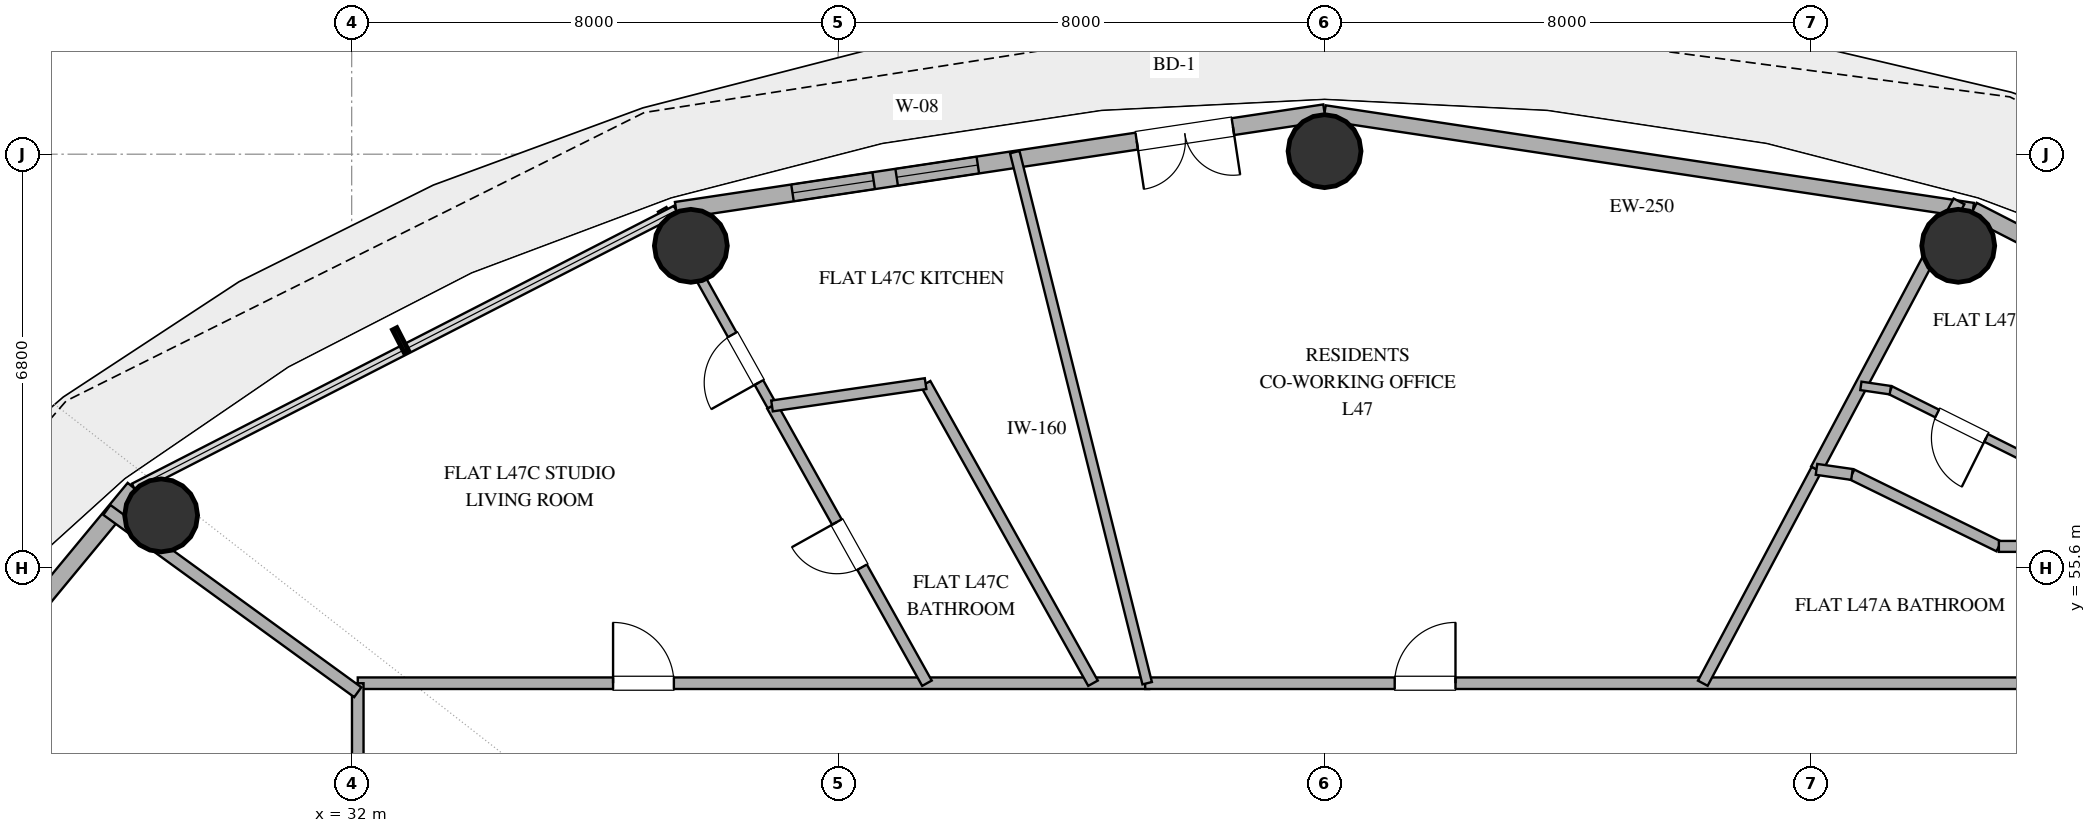
"""IFC4 building model, lengths in metres.
Left out: names, types, materials, properties, quantities, classifications, styles, units other than length and angle.
Written with IfcOpenShell. Run it as: python <this file> out.ifc"""

import sys

from ifc_helpers import new_model, si_unit, direction, frame, frame_2d, origin, origin_2d, place, context, subcontext, project, spatial, rectangle, hollow_circle, extrude, element, fill, save


model = new_model("IFC4")
c1 = context("Model", 3, precision=1e-05, world=origin(), true_north=direction((0.0, 1.0)))
c2 = subcontext(c1, "Body", "Model", "MODEL_VIEW")
j1 = project(units=[si_unit("LENGTHUNIT", "METRE"), si_unit("PLANEANGLEUNIT", "RADIAN")], contexts=[c1])
p1 = place(None, origin())
s1 = spatial("IfcSite", under=j1, at=p1, CompositionType="ELEMENT")
p2 = place(p1, origin())
s2 = spatial("IfcBuilding", under=s1, at=p2, CompositionType="ELEMENT")
p3 = place(p2, frame((0.0, 0.0, 186.6)))
s3 = spatial("IfcBuildingStorey", under=s2, at=p3, CompositionType="ELEMENT", Elevation=186.6)
for number, where, z_axis, x_axis in (
    (1, (58.422, 60.893, 0.0), (0.0, 0.0, 1.0), (1.0, 0.0, 0.0)),
    (2, (48.0, 62.45, 0.0), (0.0, 0.0, 1.0), (1.0, 0.0, 0.0)),
    (3, (37.578, 60.893, 0.0), (0.0, 0.0, 1.0), (1.0, 0.0, 0.0)),
    (4, (28.866, 56.46, 0.0), (0.0, 0.0, 1.0), (1.0, 0.0, 0.0)),
):
    element("IfcColumn", number, at=place(p3, frame(where, z_axis=z_axis, x_axis=x_axis)), inside=s3, PredefinedType="COLUMN", context=c2, shape_type="SweptSolid", body=[
        extrude(hollow_circle(Radius=0.6, WallThickness=0.032, at=origin_2d()), origin(), (0.0, 0.0, 1.0), 3.38),
    ])
p4 = place(p3, frame((67.576, 56.906, 0.0), z_axis=(0.0, 0.0, 1.0), x_axis=(-0.889872523182, 0.456209263919, 0.0)))
e5 = element("IfcWall", 5, at=p4, inside=s3, PredefinedType="SOLIDWALL", context=c2, shape_type="SweptSolid", body=[
    extrude(rectangle(XDim=10.016, YDim=0.28, at=frame_2d((5.008, 0.0))), origin(), (0.0, 0.0, 1.0), 3.38),
])
p5 = place(p4, frame((3.196, 0.0, 0.85)))
e6 = element("IfcOpeningElement", 6, at=p5, cuts=e5, PredefinedType="OPENING", context=c2, shape_type="SweptSolid", body=[
    extrude(rectangle(XDim=1.65, YDim=2.0, at=frame_2d((0.825, 1.0))), frame((0.0, 0.15, 0.0), z_axis=(0.0, -1.0, 0.0), x_axis=(1.0, 0.0, 0.0)), (0.0, 0.0, 1.0), 0.3),
])
p6 = place(p4, frame((6.524, 0.0, 0.85)))
e7 = element("IfcOpeningElement", 7, at=p6, cuts=e5, PredefinedType="OPENING", context=c2, shape_type="SweptSolid", body=[
    extrude(rectangle(XDim=1.5, YDim=2.0, at=frame_2d((0.75, 1.0))), frame((0.0, 0.15, 0.0), z_axis=(0.0, -1.0, 0.0), x_axis=(1.0, 0.0, 0.0)), (0.0, 0.0, 1.0), 0.3),
])
p7 = place(p3, frame((58.663, 61.475, 0.0), z_axis=(0.0, 0.0, 1.0), x_axis=(-0.988863993413, 0.148822049884, 0.0)))
e8 = element("IfcWall", 8, at=p7, inside=s3, PredefinedType="SOLIDWALL", context=c2, shape_type="SweptSolid", body=[
    extrude(rectangle(XDim=10.783, YDim=0.25, at=frame_2d((5.392, 0.0))), origin(), (0.0, 0.0, 1.0), 3.38),
])
p8 = place(p3, frame((48.0, 63.08, 0.0), z_axis=(0.0, 0.0, 1.0), x_axis=(-0.988863993413, -0.148822049884, 0.0)))
e9 = element("IfcWall", 9, at=p8, inside=s3, PredefinedType="SOLIDWALL", context=c2, shape_type="SweptSolid", body=[
    extrude(rectangle(XDim=10.783, YDim=0.28, at=frame_2d((5.392, 0.0))), origin(), (0.0, 0.0, 1.0), 3.38),
])
p9 = place(p8, frame((1.524, 0.0, 0.0)))
e10 = element("IfcOpeningElement", 10, at=p9, cuts=e9, PredefinedType="OPENING", context=c2, shape_type="SweptSolid", body=[
    extrude(rectangle(XDim=1.6, YDim=2.25, at=frame_2d((0.8, 1.125))), frame((0.0, 0.15, 0.0), z_axis=(0.0, -1.0, 0.0), x_axis=(1.0, 0.0, 0.0)), (0.0, 0.0, 1.0), 0.3),
])
p10 = place(p8, frame((5.767, 0.0, 0.85)))
e11 = element("IfcOpeningElement", 11, at=p10, cuts=e9, PredefinedType="OPENING", context=c2, shape_type="SweptSolid", body=[
    extrude(rectangle(XDim=1.35, YDim=1.8, at=frame_2d((0.675, 0.9))), frame((0.0, 0.15, 0.0), z_axis=(0.0, -1.0, 0.0), x_axis=(1.0, 0.0, 0.0)), (0.0, 0.0, 1.0), 0.3),
])
p11 = place(p8, frame((7.499, 0.0, 0.85)))
e12 = element("IfcOpeningElement", 12, at=p11, cuts=e9, PredefinedType="OPENING", context=c2, shape_type="SweptSolid", body=[
    extrude(rectangle(XDim=1.35, YDim=1.8, at=frame_2d((0.675, 0.9))), frame((0.0, 0.15, 0.0), z_axis=(0.0, -1.0, 0.0), x_axis=(1.0, 0.0, 0.0)), (0.0, 0.0, 1.0), 0.3),
])
p12 = place(p3, frame((28.424, 56.906, 0.0), z_axis=(0.0, 0.0, 1.0), x_axis=(-0.637333477683, -0.770588111915, 0.0)))
e13 = element("IfcWall", 13, at=p12, inside=s3, PredefinedType="SOLIDWALL", context=c2, shape_type="SweptSolid", body=[
    extrude(rectangle(XDim=8.875, YDim=0.28, at=frame_2d((4.438, 0.0))), origin(), (0.0, 0.0, 1.0), 3.38),
])
p13 = place(p12, frame((2.302, 0.0, 0.85)))
e14 = element("IfcOpeningElement", 14, at=p13, cuts=e13, PredefinedType="OPENING", context=c2, shape_type="SweptSolid", body=[
    extrude(rectangle(XDim=1.2, YDim=1.8, at=frame_2d((0.6, 0.9))), frame((0.0, 0.15, 0.0), z_axis=(0.0, -1.0, 0.0), x_axis=(1.0, 0.0, 0.0)), (0.0, 0.0, 1.0), 0.3),
])
p14 = place(p12, frame((4.344, 0.0, 0.85)))
e15 = element("IfcOpeningElement", 15, at=p14, cuts=e13, PredefinedType="OPENING", context=c2, shape_type="SweptSolid", body=[
    extrude(rectangle(XDim=1.2, YDim=1.8, at=frame_2d((0.6, 0.9))), frame((0.0, 0.15, 0.0), z_axis=(0.0, -1.0, 0.0), x_axis=(1.0, 0.0, 0.0)), (0.0, 0.0, 1.0), 0.3),
])
p15 = place(p3, frame((32.1, 53.7, 0.0), z_axis=(0.0, 0.0, 1.0), x_axis=(1.0, 0.0, 0.0)))
e16 = element("IfcWall", 16, at=p15, inside=s3, PredefinedType="PARTITIONING", context=c2, shape_type="SweptSolid", body=[
    extrude(rectangle(XDim=13.016, YDim=0.19, at=frame_2d((6.508, 0.0))), origin(), (0.0, 0.0, 1.0), 2.74),
])
p16 = place(p15, frame((4.199, 0.0, 0.0)))
e17 = element("IfcOpeningElement", 17, at=p16, cuts=e16, PredefinedType="OPENING", context=c2, shape_type="SweptSolid", body=[
    extrude(rectangle(XDim=1.0, YDim=2.2, at=frame_2d((0.5, 1.1))), frame((0.0, 0.105, 0.0), z_axis=(0.0, -1.0, 0.0), x_axis=(1.0, 0.0, 0.0)), (0.0, 0.0, 1.0), 0.21),
])
p17 = place(p3, frame((45.05, 53.7, 0.0), z_axis=(0.0, 0.0, 1.0), x_axis=(1.0, 0.0, 0.0)))
e18 = element("IfcWall", 18, at=p17, inside=s3, PredefinedType="PARTITIONING", context=c2, shape_type="SweptSolid", body=[
    extrude(rectangle(XDim=18.85, YDim=0.19, at=frame_2d((9.425, 0.0))), origin(), (0.0, 0.0, 1.0), 2.74),
])
p18 = place(p17, frame((4.104, 0.0, 0.0)))
e19 = element("IfcOpeningElement", 19, at=p18, cuts=e18, PredefinedType="OPENING", context=c2, shape_type="SweptSolid", body=[
    extrude(rectangle(XDim=1.0, YDim=2.2, at=frame_2d((0.5, 1.1))), frame((0.0, 0.105, 0.0), z_axis=(0.0, -1.0, 0.0), x_axis=(1.0, 0.0, 0.0)), (0.0, 0.0, 1.0), 0.21),
])
p19 = place(p3, frame((45.083, 53.7, 0.0), z_axis=(0.0, 0.0, 1.0), x_axis=(-0.241929318505, 0.970293875508, 0.0)))
e20 = element("IfcWall", 20, at=p19, inside=s3, PredefinedType="PLUMBINGWALL", context=c2, shape_type="SweptSolid", body=[
    extrude(rectangle(XDim=9.001, YDim=0.16, at=frame_2d((4.501, 0.0))), origin(), (0.0, 0.0, 1.0), 2.74),
])
p20 = place(p3, frame((32.1, 42.765, 0.0), z_axis=(0.0, 0.0, 1.0), x_axis=(0.0, 1.0, 0.0)))
e21 = element("IfcWall", 21, at=p20, inside=s3, PredefinedType="PARTITIONING", context=c2, shape_type="SweptSolid", body=[
    extrude(rectangle(XDim=10.935, YDim=0.19, at=frame_2d((5.467, 0.0))), origin(), (0.0, 0.0, 1.0), 2.74),
])
p21 = place(p20, frame((6.06, 0.0, 0.0)))
e22 = element("IfcOpeningElement", 22, at=p21, cuts=e21, PredefinedType="OPENING", context=c2, shape_type="SweptSolid", body=[
    extrude(rectangle(XDim=1.0, YDim=2.2, at=frame_2d((0.5, 1.1))), frame((0.0, 0.105, 0.0), z_axis=(0.0, -1.0, 0.0), x_axis=(1.0, 0.0, 0.0)), (0.0, 0.0, 1.0), 0.21),
])
p22 = place(p3, frame((41.439, 58.627, 0.0), z_axis=(0.0, 0.0, 1.0), x_axis=(0.487819418615, -0.872944565721, 0.0)))
e23 = element("IfcWall", 23, at=p22, inside=s3, PredefinedType="PLUMBINGWALL", context=c2, shape_type="SweptSolid", body=[
    extrude(rectangle(XDim=5.644, YDim=0.18, at=frame_2d((2.822, 0.0))), origin(), (0.0, 0.0, 1.0), 2.74),
])
p23 = place(p3, frame((41.461, 53.7, 0.0), z_axis=(0.0, 0.0, 1.0), x_axis=(-0.487871640049, 0.872915381257, 0.0)))
e24 = element("IfcWall", 24, at=p23, inside=s3, PredefinedType="PLUMBINGWALL", context=c2, shape_type="SweptSolid", body=[
    extrude(rectangle(XDim=5.223, YDim=0.18, at=frame_2d((2.612, 0.0))), origin(), (0.0, 0.0, 1.0), 2.74),
])
p24 = place(p23, frame((2.187, 0.0, 0.0)))
e25 = element("IfcOpeningElement", 25, at=p24, cuts=e24, PredefinedType="OPENING", context=c2, shape_type="SweptSolid", body=[
    extrude(rectangle(XDim=0.85, YDim=2.1, at=frame_2d((0.425, 1.05))), frame((0.0, 0.1, 0.0), z_axis=(0.0, -1.0, 0.0), x_axis=(1.0, 0.0, 0.0)), (0.0, 0.0, 1.0), 0.2),
])
p25 = place(p3, frame((32.1, 53.552, 0.0), z_axis=(0.0, 0.0, 1.0), x_axis=(-0.809023715391, 0.587776001496, 0.0)))
e26 = element("IfcWall", 26, at=p25, inside=s3, PredefinedType="PARTITIONING", context=c2, shape_type="SweptSolid", body=[
    extrude(rectangle(XDim=5.1, YDim=0.2, at=frame_2d((2.55, 0.0))), origin(), (0.0, 0.0, 1.0), 2.74),
])
p26 = place(p3, frame((54.221, 53.7, 0.0), z_axis=(0.0, 0.0, 1.0), x_axis=(0.469480828888, 0.882942665922, 0.0)))
e27 = element("IfcWall", 27, at=p26, inside=s3, PredefinedType="PLUMBINGWALL", context=c2, shape_type="SweptSolid", body=[
    extrude(rectangle(XDim=3.983, YDim=0.18, at=frame_2d((1.992, 0.0))), origin(), (0.0, 0.0, 1.0), 2.74),
])
p27 = place(p3, frame((38.913, 58.26, 0.0), z_axis=(0.0, 0.0, 1.0), x_axis=(-0.487830223896, 0.87293852742, 0.0)))
e28 = element("IfcWall", 28, at=p27, inside=s3, PredefinedType="PLUMBINGWALL", context=c2, shape_type="SweptSolid", body=[
    extrude(rectangle(XDim=3.703, YDim=0.16, at=frame_2d((1.852, 0.0))), origin(), (0.0, 0.0, 1.0), 2.74),
])
p28 = place(p27, frame((0.441, 0.0, 0.0)))
e29 = element("IfcOpeningElement", 29, at=p28, cuts=e28, PredefinedType="OPENING", context=c2, shape_type="SweptSolid", body=[
    extrude(rectangle(XDim=0.9, YDim=2.1, at=frame_2d((0.45, 1.05))), frame((0.0, 0.09, 0.0), z_axis=(0.0, -1.0, 0.0), x_axis=(1.0, 0.0, 0.0)), (0.0, 0.0, 1.0), 0.18),
])
p29 = place(p3, frame((56.091, 57.217, 0.0), z_axis=(0.0, 0.0, 1.0), x_axis=(0.469455598571, 0.882956080997, 0.0)))
e30 = element("IfcWall", 30, at=p29, inside=s3, PredefinedType="PARTITIONING", context=c2, shape_type="SweptSolid", body=[
    extrude(rectangle(XDim=4.991, YDim=0.2, at=frame_2d((2.496, 0.0))), origin(), (0.0, 0.0, 1.0), 2.74),
])
p30 = place(p3, frame((56.674, 57.133, 0.0), z_axis=(0.0, 0.0, 1.0), x_axis=(0.898063439596, -0.439865955105, 0.0)))
e31 = element("IfcWall", 31, at=p30, inside=s3, PredefinedType="PLUMBINGWALL", context=c2, shape_type="SweptSolid", body=[
    extrude(rectangle(XDim=2.69, YDim=0.18, at=frame_2d((1.345, 0.0))), origin(), (0.0, 0.0, 1.0), 2.74),
])
p31 = place(p3, frame((59.651, 57.35, 0.0), z_axis=(0.0, 0.0, 1.0), x_axis=(-0.895041110332, 0.445983644112, 0.0)))
e32 = element("IfcWall", 32, at=p31, inside=s3, PredefinedType="PARTITIONING", context=c2, shape_type="SweptSolid", body=[
    extrude(rectangle(XDim=2.621, YDim=0.14, at=frame_2d((1.311, 0.0))), origin(), (0.0, 0.0, 1.0), 2.74),
])
p32 = place(p31, frame((0.861, 0.0, 0.0)))
e33 = element("IfcOpeningElement", 33, at=p32, cuts=e32, PredefinedType="OPENING", context=c2, shape_type="SweptSolid", body=[
    extrude(rectangle(XDim=0.9, YDim=2.1, at=frame_2d((0.45, 1.05))), frame((0.0, 0.08, 0.0), z_axis=(0.0, -1.0, 0.0), x_axis=(1.0, 0.0, 0.0)), (0.0, 0.0, 1.0), 0.16),
])
p33 = place(p3, frame((38.913, 58.26, 0.0), z_axis=(0.0, 0.0, 1.0), x_axis=(0.989598326399, 0.143858098096, 0.0)))
e34 = element("IfcWall", 34, at=p33, inside=s3, PredefinedType="PLUMBINGWALL", context=c2, shape_type="SweptSolid", body=[
    extrude(rectangle(XDim=2.552, YDim=0.18, at=frame_2d((1.276, 0.0))), origin(), (0.0, 0.0, 1.0), 2.74),
])
p34 = place(p3, frame((59.09, 55.95, 0.0), z_axis=(0.0, 0.0, 1.0), x_axis=(1.0, 0.0, 0.0)))
e35 = element("IfcWall", 35, at=p34, inside=s3, PredefinedType="PLUMBINGWALL", context=c2, shape_type="SweptSolid", body=[
    extrude(rectangle(XDim=1.737, YDim=0.18, at=frame_2d((0.868, 0.0))), origin(), (0.0, 0.0, 1.0), 2.74),
])
p35 = place(p3, frame((56.091, 57.217, 0.0), z_axis=(0.0, 0.0, 1.0), x_axis=(0.989841434531, -0.142175716936, 0.0)))
e36 = element("IfcWall", 36, at=p35, inside=s3, PredefinedType="PLUMBINGWALL", context=c2, shape_type="SweptSolid", body=[
    extrude(rectangle(XDim=0.589, YDim=0.18, at=frame_2d((0.294, 0.0))), origin(), (0.0, 0.0, 1.0), 2.74),
])
p36 = place(p3, frame((57.305, 58.519, 0.0), z_axis=(0.0, 0.0, 1.0), x_axis=(-0.989485449351, 0.144632449754, 0.0)))
e37 = element("IfcWall", 37, at=p36, inside=s3, PredefinedType="PARTITIONING", context=c2, shape_type="SweptSolid", body=[
    extrude(rectangle(XDim=0.49, YDim=0.14, at=frame_2d((0.245, 0.0))), origin(), (0.0, 0.0, 1.0), 2.74),
])
p37 = place(p9, origin())
e38 = element("IfcDoor", 38, at=p37, inside=s3, OperationType="DOUBLE_DOOR_SINGLE_SWING", PredefinedType="DOOR", context=c2, shape_type="SweptSolid", body=[
    extrude(rectangle(XDim=1.6, YDim=2.25, at=frame_2d((0.8, 1.125))), frame((0.0, 0.025, 0.0), z_axis=(0.0, -1.0, 0.0), x_axis=(1.0, 0.0, 0.0)), (0.0, 0.0, 1.0), 0.05),
])
fill(e10, e38)
p38 = place(p10, origin())
e39 = element("IfcWindow", 39, at=p38, inside=s3, PartitioningType="SINGLE_PANEL", PredefinedType="WINDOW", context=c2, shape_type="SweptSolid", body=[
    extrude(rectangle(XDim=1.35, YDim=1.8, at=frame_2d((0.675, 0.9))), frame((0.0, 0.03, 0.0), z_axis=(0.0, -1.0, 0.0), x_axis=(1.0, 0.0, 0.0)), (0.0, 0.0, 1.0), 0.06),
])
fill(e11, e39)
p39 = place(p11, origin())
e40 = element("IfcWindow", 40, at=p39, inside=s3, PartitioningType="SINGLE_PANEL", PredefinedType="WINDOW", context=c2, shape_type="SweptSolid", body=[
    extrude(rectangle(XDim=1.35, YDim=1.8, at=frame_2d((0.675, 0.9))), frame((0.0, 0.03, 0.0), z_axis=(0.0, -1.0, 0.0), x_axis=(1.0, 0.0, 0.0)), (0.0, 0.0, 1.0), 0.06),
])
fill(e12, e40)
p40 = place(p16, origin())
e41 = element("IfcDoor", 41, at=p40, inside=s3, OperationType="SINGLE_SWING_LEFT", PredefinedType="DOOR", context=c2, shape_type="SweptSolid", body=[
    extrude(rectangle(XDim=1.0, YDim=2.2, at=frame_2d((0.5, 1.1))), frame((0.0, 0.025, 0.0), z_axis=(0.0, -1.0, 0.0), x_axis=(1.0, 0.0, 0.0)), (0.0, 0.0, 1.0), 0.05),
])
fill(e17, e41)
p41 = place(p18, origin())
e42 = element("IfcDoor", 42, at=p41, inside=s3, OperationType="SINGLE_SWING_RIGHT", PredefinedType="DOOR", context=c2, shape_type="SweptSolid", body=[
    extrude(rectangle(XDim=1.0, YDim=2.2, at=frame_2d((0.5, 1.1))), frame((0.0, 0.025, 0.0), z_axis=(0.0, -1.0, 0.0), x_axis=(1.0, 0.0, 0.0)), (0.0, 0.0, 1.0), 0.05),
])
fill(e19, e42)
p42 = place(p24, origin())
e43 = element("IfcDoor", 43, at=p42, inside=s3, OperationType="SINGLE_SWING_RIGHT", PredefinedType="DOOR", context=c2, shape_type="SweptSolid", body=[
    extrude(rectangle(XDim=0.85, YDim=2.1, at=frame_2d((0.425, 1.05))), frame((0.0, 0.025, 0.0), z_axis=(0.0, -1.0, 0.0), x_axis=(1.0, 0.0, 0.0)), (0.0, 0.0, 1.0), 0.05),
])
fill(e25, e43)
p43 = place(p28, origin())
e44 = element("IfcDoor", 44, at=p43, inside=s3, OperationType="SINGLE_SWING_LEFT", PredefinedType="DOOR", context=c2, shape_type="SweptSolid", body=[
    extrude(rectangle(XDim=0.9, YDim=2.1, at=frame_2d((0.45, 1.05))), frame((0.0, 0.025, 0.0), z_axis=(0.0, -1.0, 0.0), x_axis=(1.0, 0.0, 0.0)), (0.0, 0.0, 1.0), 0.05),
])
fill(e29, e44)
p44 = place(p32, origin())
e45 = element("IfcDoor", 45, at=p44, inside=s3, OperationType="SINGLE_SWING_LEFT", PredefinedType="DOOR", context=c2, shape_type="SweptSolid", body=[
    extrude(rectangle(XDim=0.9, YDim=2.1, at=frame_2d((0.45, 1.05))), frame((0.0, 0.025, 0.0), z_axis=(0.0, -1.0, 0.0), x_axis=(1.0, 0.0, 0.0)), (0.0, 0.0, 1.0), 0.05),
])
fill(e33, e45)
save(model, sys.argv[1])
